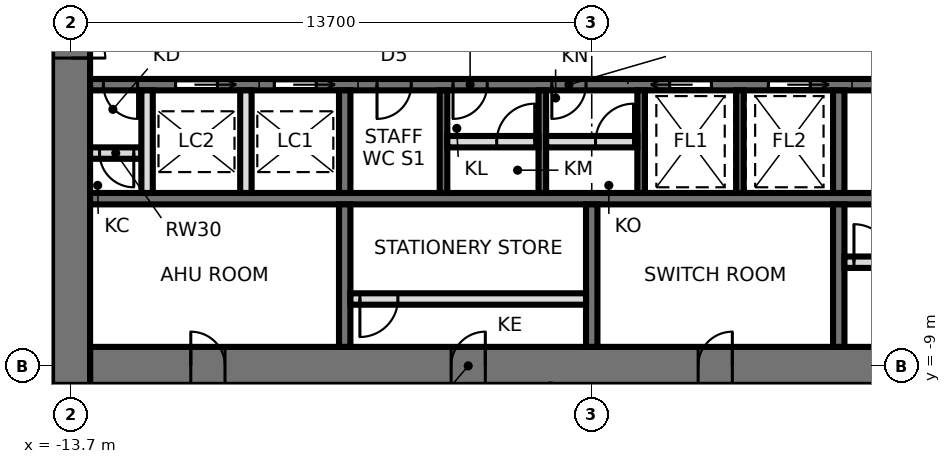
"""IFC4 building model, lengths in metres.
Left out: names, types, materials, properties, quantities, classifications, styles, units other than length and angle.
Written with IfcOpenShell. Run it as: python <this file> out.ifc"""

import sys

from ifc_helpers import new_model, si_unit, direction, frame, frame_2d, origin, place, context, subcontext, project, spatial, rectangle, extrude, element, fill, save


model = new_model("IFC4")
c1 = context("Model", 3, precision=1e-05, world=origin(), true_north=direction((0.0, 1.0)))
c2 = subcontext(c1, "Body", "Model", "MODEL_VIEW")
j1 = project(units=[si_unit("LENGTHUNIT", "METRE"), si_unit("PLANEANGLEUNIT", "RADIAN")], contexts=[c1])
p1 = place(None, origin())
s1 = spatial("IfcSite", under=j1, at=p1, CompositionType="ELEMENT")
p2 = place(p1, origin())
s2 = spatial("IfcBuilding", under=s1, at=p2, CompositionType="ELEMENT")
p3 = place(p2, frame((0.0, 0.0, 187.7)))
s3 = spatial("IfcBuildingStorey", under=s2, at=p3, CompositionType="ELEMENT", Elevation=187.7)
p4 = place(p3, frame((-13.2, -9.0, 0.0), z_axis=(0.0, 0.0, 1.0), x_axis=(1.0, 0.0, 0.0)))
e1 = element("IfcWall", 1, at=p4, inside=s3, PredefinedType="SHEAR", context=c2, shape_type="SweptSolid", body=[
    extrude(rectangle(XDim=26.4, YDim=1.0, at=frame_2d((13.2, 0.0))), origin(), (0.0, 0.0, 1.0), 3.9),
])
p5 = place(p4, frame((2.65, 0.0, 0.0)))
e2 = element("IfcOpeningElement", 2, at=p5, cuts=e1, PredefinedType="OPENING", context=c2, shape_type="SweptSolid", body=[
    extrude(rectangle(XDim=0.9, YDim=2.1, at=frame_2d((0.45, 1.05))), frame((0.0, 0.51, 0.0), z_axis=(0.0, -1.0, 0.0), x_axis=(1.0, 0.0, 0.0)), (0.0, 0.0, 1.0), 1.02),
])
p6 = place(p4, frame((9.5, 0.0, 0.0)))
e3 = element("IfcOpeningElement", 3, at=p6, cuts=e1, PredefinedType="OPENING", context=c2, shape_type="SweptSolid", body=[
    extrude(rectangle(XDim=0.9, YDim=2.1, at=frame_2d((0.45, 1.05))), frame((0.0, 0.51, 0.0), z_axis=(0.0, -1.0, 0.0), x_axis=(1.0, 0.0, 0.0)), (0.0, 0.0, 1.0), 1.02),
])
p7 = place(p4, frame((16.0, 0.0, 0.0)))
e4 = element("IfcOpeningElement", 4, at=p7, cuts=e1, PredefinedType="OPENING", context=c2, shape_type="SweptSolid", body=[
    extrude(rectangle(XDim=0.9, YDim=2.1, at=frame_2d((0.45, 1.05))), frame((0.0, 0.51, 0.0), z_axis=(0.0, -1.0, 0.0), x_axis=(1.0, 0.0, 0.0)), (0.0, 0.0, 1.0), 1.02),
])
p8 = place(p4, frame((22.85, 0.0, 0.0)))
e5 = element("IfcOpeningElement", 5, at=p8, cuts=e1, PredefinedType="OPENING", context=c2, shape_type="SweptSolid", body=[
    extrude(rectangle(XDim=0.9, YDim=2.1, at=frame_2d((0.45, 1.05))), frame((0.0, 0.51, 0.0), z_axis=(0.0, -1.0, 0.0), x_axis=(1.0, 0.0, 0.0)), (0.0, 0.0, 1.0), 1.02),
])
p9 = place(p3, frame((-13.7, 9.5, 0.0), z_axis=(0.0, 0.0, 1.0), x_axis=(0.0, -1.0, 0.0)))
e6 = element("IfcWall", 6, at=p9, inside=s3, PredefinedType="SHEAR", context=c2, shape_type="SweptSolid", body=[
    extrude(rectangle(XDim=19.0, YDim=1.0, at=frame_2d((9.5, 0.0))), origin(), (0.0, 0.0, 1.0), 3.9),
])
p10 = place(p9, frame((8.6, 0.0, 0.0)))
e7 = element("IfcOpeningElement", 7, at=p10, cuts=e6, PredefinedType="OPENING", context=c2, shape_type="SweptSolid", body=[
    extrude(rectangle(XDim=1.8, YDim=2.4, at=frame_2d((0.9, 1.2))), frame((0.0, 0.51, 0.0), z_axis=(0.0, -1.0, 0.0), x_axis=(1.0, 0.0, 0.0)), (0.0, 0.0, 1.0), 1.02),
])
p11 = place(p3, frame((-13.2, -1.6, 0.0), z_axis=(0.0, 0.0, 1.0), x_axis=(1.0, 0.0, 0.0)))
e8 = element("IfcWall", 8, at=p11, inside=s3, PredefinedType="SHEAR", context=c2, shape_type="SweptSolid", body=[
    extrude(rectangle(XDim=26.4, YDim=0.3, at=frame_2d((13.2, 0.0))), origin(), (0.0, 0.0, 1.0), 3.9),
])
p12 = place(p11, frame((25.15, 0.0, 0.0)))
e9 = element("IfcOpeningElement", 9, at=p12, cuts=e8, PredefinedType="OPENING", context=c2, shape_type="SweptSolid", body=[
    extrude(rectangle(XDim=1.0, YDim=2.1, at=frame_2d((0.5, 1.05))), frame((0.0, 0.16, 0.0), z_axis=(0.0, -1.0, 0.0), x_axis=(1.0, 0.0, 0.0)), (0.0, 0.0, 1.0), 0.32),
])
p13 = place(p11, frame((7.55, 0.0, 0.0)))
e10 = element("IfcOpeningElement", 10, at=p13, cuts=e8, PredefinedType="OPENING", context=c2, shape_type="SweptSolid", body=[
    extrude(rectangle(XDim=0.9, YDim=2.1, at=frame_2d((0.45, 1.05))), frame((0.0, 0.16, 0.0), z_axis=(0.0, -1.0, 0.0), x_axis=(1.0, 0.0, 0.0)), (0.0, 0.0, 1.0), 0.32),
])
p14 = place(p11, frame((9.55, 0.0, 0.0)))
e11 = element("IfcOpeningElement", 11, at=p14, cuts=e8, PredefinedType="OPENING", context=c2, shape_type="SweptSolid", body=[
    extrude(rectangle(XDim=0.9, YDim=2.1, at=frame_2d((0.45, 1.05))), frame((0.0, 0.16, 0.0), z_axis=(0.0, -1.0, 0.0), x_axis=(1.0, 0.0, 0.0)), (0.0, 0.0, 1.0), 0.32),
])
p15 = place(p11, frame((12.15, 0.0, 0.0)))
e12 = element("IfcOpeningElement", 12, at=p15, cuts=e8, PredefinedType="OPENING", context=c2, shape_type="SweptSolid", body=[
    extrude(rectangle(XDim=0.9, YDim=2.1, at=frame_2d((0.45, 1.05))), frame((0.0, 0.16, 0.0), z_axis=(0.0, -1.0, 0.0), x_axis=(1.0, 0.0, 0.0)), (0.0, 0.0, 1.0), 0.32),
])
p16 = place(p11, frame((15.25, 0.0, 0.0)))
e13 = element("IfcOpeningElement", 13, at=p16, cuts=e8, PredefinedType="OPENING", context=c2, shape_type="SweptSolid", body=[
    extrude(rectangle(XDim=1.1, YDim=2.3, at=frame_2d((0.55, 1.15))), frame((0.0, 0.16, 0.0), z_axis=(0.0, -1.0, 0.0), x_axis=(1.0, 0.0, 0.0)), (0.0, 0.0, 1.0), 0.32),
])
p17 = place(p11, frame((17.85, 0.0, 0.0)))
e14 = element("IfcOpeningElement", 14, at=p17, cuts=e8, PredefinedType="OPENING", context=c2, shape_type="SweptSolid", body=[
    extrude(rectangle(XDim=1.1, YDim=2.3, at=frame_2d((0.55, 1.15))), frame((0.0, 0.16, 0.0), z_axis=(0.0, -1.0, 0.0), x_axis=(1.0, 0.0, 0.0)), (0.0, 0.0, 1.0), 0.32),
])
p18 = place(p11, frame((4.85, 0.0, 0.0)))
e15 = element("IfcOpeningElement", 15, at=p18, cuts=e8, PredefinedType="OPENING", context=c2, shape_type="SweptSolid", body=[
    extrude(rectangle(XDim=1.1, YDim=2.3, at=frame_2d((0.55, 1.15))), frame((0.0, 0.16, 0.0), z_axis=(0.0, -1.0, 0.0), x_axis=(1.0, 0.0, 0.0)), (0.0, 0.0, 1.0), 0.32),
])
p19 = place(p11, frame((2.25, 0.0, 0.0)))
e16 = element("IfcOpeningElement", 16, at=p19, cuts=e8, PredefinedType="OPENING", context=c2, shape_type="SweptSolid", body=[
    extrude(rectangle(XDim=1.1, YDim=2.3, at=frame_2d((0.55, 1.15))), frame((0.0, 0.16, 0.0), z_axis=(0.0, -1.0, 0.0), x_axis=(1.0, 0.0, 0.0)), (0.0, 0.0, 1.0), 0.32),
])
p20 = place(p11, frame((0.35, 0.0, 0.0)))
e17 = element("IfcOpeningElement", 17, at=p20, cuts=e8, PredefinedType="OPENING", context=c2, shape_type="SweptSolid", body=[
    extrude(rectangle(XDim=0.9, YDim=2.1, at=frame_2d((0.45, 1.05))), frame((0.0, 0.16, 0.0), z_axis=(0.0, -1.0, 0.0), x_axis=(1.0, 0.0, 0.0)), (0.0, 0.0, 1.0), 0.32),
])
p21 = place(p3, frame((-13.2, -4.6, 0.0), z_axis=(0.0, 0.0, 1.0), x_axis=(1.0, 0.0, 0.0)))
e18 = element("IfcWall", 18, at=p21, inside=s3, PredefinedType="SHEAR", context=c2, shape_type="SweptSolid", body=[
    extrude(rectangle(XDim=26.4, YDim=0.3, at=frame_2d((13.2, 0.0))), origin(), (0.0, 0.0, 1.0), 3.9),
])
p22 = place(p3, frame((-6.5, -1.75, 0.0), z_axis=(0.0, 0.0, 1.0), x_axis=(0.0, -1.0, 0.0)))
e19 = element("IfcWall", 19, at=p22, inside=s3, PredefinedType="SHEAR", context=c2, shape_type="SweptSolid", body=[
    extrude(rectangle(XDim=2.7, YDim=0.3, at=frame_2d((1.35, 0.0))), origin(), (0.0, 0.0, 1.0), 3.9),
])
p23 = place(p3, frame((-6.5, -4.75, 0.0), z_axis=(0.0, 0.0, 1.0), x_axis=(0.0, -1.0, 0.0)))
e20 = element("IfcWall", 20, at=p23, inside=s3, PredefinedType="SHEAR", context=c2, shape_type="SweptSolid", body=[
    extrude(rectangle(XDim=3.75, YDim=0.3, at=frame_2d((1.875, 0.0))), origin(), (0.0, 0.0, 1.0), 3.9),
])
p24 = place(p3, frame((6.5, -1.75, 0.0), z_axis=(0.0, 0.0, 1.0), x_axis=(0.0, -1.0, 0.0)))
e21 = element("IfcWall", 21, at=p24, inside=s3, PredefinedType="SHEAR", context=c2, shape_type="SweptSolid", body=[
    extrude(rectangle(XDim=2.7, YDim=0.3, at=frame_2d((1.35, 0.0))), origin(), (0.0, 0.0, 1.0), 3.9),
])
p25 = place(p3, frame((6.5, -4.75, 0.0), z_axis=(0.0, 0.0, 1.0), x_axis=(0.0, -1.0, 0.0)))
e22 = element("IfcWall", 22, at=p25, inside=s3, PredefinedType="SHEAR", context=c2, shape_type="SweptSolid", body=[
    extrude(rectangle(XDim=3.75, YDim=0.3, at=frame_2d((1.875, 0.0))), origin(), (0.0, 0.0, 1.0), 3.9),
])
for number, where, z_axis, x_axis in (
    (23, (-3.9, -1.75, 0.0), (0.0, 0.0, 1.0), (0.0, -1.0, 0.0)),
    (24, (-1.3, -1.75, 0.0), (0.0, 0.0, 1.0), (0.0, -1.0, 0.0)),
    (25, (1.3, -1.75, 0.0), (0.0, 0.0, 1.0), (0.0, -1.0, 0.0)),
    (26, (3.9, -1.75, 0.0), (0.0, 0.0, 1.0), (0.0, -1.0, 0.0)),
):
    element("IfcWall", number, at=place(p3, frame(where, z_axis=z_axis, x_axis=x_axis)), inside=s3, PredefinedType="SHEAR", context=c2, shape_type="SweptSolid", body=[
        extrude(rectangle(XDim=2.7, YDim=0.2, at=frame_2d((1.35, 0.0))), origin(), (0.0, 0.0, 1.0), 3.9),
    ])
p26 = place(p3, frame((0.0, -4.75, 0.0), z_axis=(0.0, 0.0, 1.0), x_axis=(0.0, -1.0, 0.0)))
e27 = element("IfcWall", 27, at=p26, inside=s3, PredefinedType="SHEAR", context=c2, shape_type="SweptSolid", body=[
    extrude(rectangle(XDim=3.75, YDim=0.3, at=frame_2d((1.875, 0.0))), origin(), (0.0, 0.0, 1.0), 3.9),
])
p27 = place(p3, frame((-3.8, -3.1, 0.0), z_axis=(0.0, 0.0, 1.0), x_axis=(1.0, 0.0, 0.0)))
e28 = element("IfcWall", 28, at=p27, inside=s3, PredefinedType="PARTITIONING", context=c2, shape_type="SweptSolid", body=[
    extrude(rectangle(XDim=2.4, YDim=0.3, at=frame_2d((1.2, 0.0))), origin(), (0.0, 0.0, 1.0), 3.74),
])
p28 = place(p27, frame((1.3, 0.0, 0.0)))
e29 = element("IfcOpeningElement", 29, at=p28, cuts=e28, PredefinedType="OPENING", context=c2, shape_type="SweptSolid", body=[
    extrude(rectangle(XDim=1.0, YDim=2.4, at=frame_2d((0.5, 1.2))), frame((0.0, 0.16, 0.0), z_axis=(0.0, -1.0, 0.0), x_axis=(1.0, 0.0, 0.0)), (0.0, 0.0, 1.0), 0.32),
])
p29 = place(p3, frame((-1.2, -3.1, 0.0), z_axis=(0.0, 0.0, 1.0), x_axis=(1.0, 0.0, 0.0)))
e30 = element("IfcWall", 30, at=p29, inside=s3, PredefinedType="PARTITIONING", context=c2, shape_type="SweptSolid", body=[
    extrude(rectangle(XDim=2.4, YDim=0.3, at=frame_2d((1.2, 0.0))), origin(), (0.0, 0.0, 1.0), 3.74),
])
p30 = place(p29, frame((1.3, 0.0, 0.0)))
e31 = element("IfcOpeningElement", 31, at=p30, cuts=e30, PredefinedType="OPENING", context=c2, shape_type="SweptSolid", body=[
    extrude(rectangle(XDim=1.0, YDim=2.4, at=frame_2d((0.5, 1.2))), frame((0.0, 0.16, 0.0), z_axis=(0.0, -1.0, 0.0), x_axis=(1.0, 0.0, 0.0)), (0.0, 0.0, 1.0), 0.32),
])
p31 = place(p3, frame((-6.35, -7.24, 0.0), z_axis=(0.0, 0.0, 1.0), x_axis=(1.0, 0.0, 0.0)))
e32 = element("IfcWall", 32, at=p31, inside=s3, PredefinedType="PARTITIONING", context=c2, shape_type="SweptSolid", body=[
    extrude(rectangle(XDim=6.2, YDim=0.3, at=frame_2d((3.1, 0.0))), origin(), (0.0, 0.0, 1.0), 3.74),
])
p32 = place(p31, frame((0.25, 0.0, 0.0)))
e33 = element("IfcOpeningElement", 33, at=p32, cuts=e32, PredefinedType="OPENING", context=c2, shape_type="SweptSolid", body=[
    extrude(rectangle(XDim=1.0, YDim=2.4, at=frame_2d((0.5, 1.2))), frame((0.0, 0.16, 0.0), z_axis=(0.0, -1.0, 0.0), x_axis=(1.0, 0.0, 0.0)), (0.0, 0.0, 1.0), 0.32),
])
p33 = place(p3, frame((6.65, -6.272, 0.0), z_axis=(0.0, 0.0, 1.0), x_axis=(1.0, 0.0, 0.0)))
e34 = element("IfcWall", 34, at=p33, inside=s3, PredefinedType="PARTITIONING", context=c2, shape_type="SweptSolid", body=[
    extrude(rectangle(XDim=6.55, YDim=0.3, at=frame_2d((3.275, 0.0))), origin(), (0.0, 0.0, 1.0), 3.74),
])
p34 = place(p33, frame((0.25, 0.0, 0.0)))
e35 = element("IfcOpeningElement", 35, at=p34, cuts=e34, PredefinedType="OPENING", context=c2, shape_type="SweptSolid", body=[
    extrude(rectangle(XDim=1.0, YDim=2.4, at=frame_2d((0.5, 1.2))), frame((0.0, 0.16, 0.0), z_axis=(0.0, -1.0, 0.0), x_axis=(1.0, 0.0, 0.0)), (0.0, 0.0, 1.0), 0.32),
])
p35 = place(p3, frame((-13.2, -3.4, 0.0), z_axis=(0.0, 0.0, 1.0), x_axis=(1.0, 0.0, 0.0)))
e36 = element("IfcWall", 36, at=p35, inside=s3, PredefinedType="SOLIDWALL", context=c2, shape_type="SweptSolid", body=[
    extrude(rectangle(XDim=1.35, YDim=0.3, at=frame_2d((0.675, 0.0))), origin(), (0.0, 0.0, 1.0), 3.74),
])
p36 = place(p35, frame((0.25, 0.0, 0.0)))
e37 = element("IfcOpeningElement", 37, at=p36, cuts=e36, PredefinedType="OPENING", context=c2, shape_type="SweptSolid", body=[
    extrude(rectangle(XDim=0.9, YDim=2.1, at=frame_2d((0.45, 1.05))), frame((0.0, 0.16, 0.0), z_axis=(0.0, -1.0, 0.0), x_axis=(1.0, 0.0, 0.0)), (0.0, 0.0, 1.0), 0.32),
])
for number, where, z_axis, x_axis in (
    (38, (-9.1, -1.75, 0.0), (0.0, 0.0, 1.0), (0.0, -1.0, 0.0)),
    (39, (-11.7, -1.75, 0.0), (0.0, 0.0, 1.0), (0.0, -1.0, 0.0)),
):
    element("IfcWall", number, at=place(p3, frame(where, z_axis=z_axis, x_axis=x_axis)), inside=s3, PredefinedType="SOLIDWALL", context=c2, shape_type="SweptSolid", body=[
        extrude(rectangle(XDim=2.7, YDim=0.3, at=frame_2d((1.35, 0.0))), origin(), (0.0, 0.0, 1.0), 3.74),
    ])
p37 = place(p3, frame((-2.196, -20.896, 0.0), z_axis=(0.0, 0.0, 1.0), x_axis=(0.104527293836, 0.99452201828, 0.0)))
e40 = element("IfcWall", 40, at=p37, inside=s3, PredefinedType="PARTITIONING", context=c2, shape_type="SweptSolid", body=[
    extrude(rectangle(XDim=11.459, YDim=0.12, at=frame_2d((5.729, 0.0))), origin(), (0.0, 0.0, 1.0), 3.74),
])
p38 = place(p37, frame((5.254, 0.0, 0.0)))
e41 = element("IfcOpeningElement", 41, at=p38, cuts=e40, PredefinedType="OPENING", context=c2, shape_type="SweptSolid", body=[
    extrude(rectangle(XDim=1.0, YDim=2.4, at=frame_2d((0.5, 1.2))), frame((0.0, 0.07, 0.0), z_axis=(0.0, -1.0, 0.0), x_axis=(1.0, 0.0, 0.0)), (0.0, 0.0, 1.0), 0.14),
])
p39 = place(p10, origin())
e42 = element("IfcDoor", 42, at=p39, inside=s3, OperationType="DOUBLE_DOOR_SINGLE_SWING", PredefinedType="DOOR", context=c2, shape_type="SweptSolid", body=[
    extrude(rectangle(XDim=1.72, YDim=2.36, at=frame_2d((0.9, 1.18))), frame((0.0, 0.025, 0.0), z_axis=(0.0, -1.0, 0.0), x_axis=(1.0, 0.0, 0.0)), (0.0, 0.0, 1.0), 0.05),
    extrude(rectangle(XDim=0.04, YDim=2.4, at=frame_2d((0.02, 1.2))), frame((0.0, 0.25, 0.0), z_axis=(0.0, -1.0, 0.0), x_axis=(1.0, 0.0, 0.0)), (0.0, 0.0, 1.0), 0.5),
    extrude(rectangle(XDim=0.04, YDim=2.4, at=frame_2d((1.78, 1.2))), frame((0.0, 0.25, 0.0), z_axis=(0.0, -1.0, 0.0), x_axis=(1.0, 0.0, 0.0)), (0.0, 0.0, 1.0), 0.5),
    extrude(rectangle(XDim=1.72, YDim=0.04, at=frame_2d((0.9, 2.38))), frame((0.0, 0.25, 0.0), z_axis=(0.0, -1.0, 0.0), x_axis=(1.0, 0.0, 0.0)), (0.0, 0.0, 1.0), 0.5),
])
fill(e7, e42)
p40 = place(p13, frame((0.9, 0.0, 0.0), z_axis=(0.0, 0.0, 1.0), x_axis=(-1.0, 0.0, 0.0)))
e43 = element("IfcDoor", 43, at=p40, inside=s3, OperationType="SINGLE_SWING_RIGHT", PredefinedType="DOOR", context=c2, shape_type="SweptSolid", body=[
    extrude(rectangle(XDim=0.9, YDim=2.1, at=frame_2d((0.45, 1.05))), frame((0.0, 0.025, 0.0), z_axis=(0.0, -1.0, 0.0), x_axis=(1.0, 0.0, 0.0)), (0.0, 0.0, 1.0), 0.05),
])
fill(e10, e43)
p41 = place(p28, origin())
e44 = element("IfcDoor", 44, at=p41, inside=s3, OperationType="SINGLE_SWING_RIGHT", PredefinedType="DOOR", context=c2, shape_type="SweptSolid", body=[
    extrude(rectangle(XDim=1.0, YDim=2.4, at=frame_2d((0.5, 1.2))), frame((0.0, 0.025, 0.0), z_axis=(0.0, -1.0, 0.0), x_axis=(1.0, 0.0, 0.0)), (0.0, 0.0, 1.0), 0.05),
])
fill(e29, e44)
p42 = place(p14, frame((0.9, 0.0, 0.0), z_axis=(0.0, 0.0, 1.0), x_axis=(-1.0, 0.0, 0.0)))
e45 = element("IfcDoor", 45, at=p42, inside=s3, OperationType="SINGLE_SWING_RIGHT", PredefinedType="DOOR", context=c2, shape_type="SweptSolid", body=[
    extrude(rectangle(XDim=0.9, YDim=2.1, at=frame_2d((0.45, 1.05))), frame((0.0, 0.025, 0.0), z_axis=(0.0, -1.0, 0.0), x_axis=(1.0, 0.0, 0.0)), (0.0, 0.0, 1.0), 0.05),
])
fill(e11, e45)
p43 = place(p30, origin())
e46 = element("IfcDoor", 46, at=p43, inside=s3, OperationType="SINGLE_SWING_RIGHT", PredefinedType="DOOR", context=c2, shape_type="SweptSolid", body=[
    extrude(rectangle(XDim=1.0, YDim=2.4, at=frame_2d((0.5, 1.2))), frame((0.0, 0.025, 0.0), z_axis=(0.0, -1.0, 0.0), x_axis=(1.0, 0.0, 0.0)), (0.0, 0.0, 1.0), 0.05),
])
fill(e31, e46)
p44 = place(p15, frame((0.9, 0.0, 0.0), z_axis=(0.0, 0.0, 1.0), x_axis=(-1.0, 0.0, 0.0)))
e47 = element("IfcDoor", 47, at=p44, inside=s3, OperationType="SINGLE_SWING_RIGHT", PredefinedType="DOOR", context=c2, shape_type="SweptSolid", body=[
    extrude(rectangle(XDim=0.9, YDim=2.1, at=frame_2d((0.45, 1.05))), frame((0.0, 0.025, 0.0), z_axis=(0.0, -1.0, 0.0), x_axis=(1.0, 0.0, 0.0)), (0.0, 0.0, 1.0), 0.05),
])
fill(e12, e47)
p45 = place(p16, frame((1.1, 0.0, 0.0), z_axis=(0.0, 0.0, 1.0), x_axis=(-1.0, 0.0, 0.0)))
e48 = element("IfcDoor", 48, at=p45, inside=s3, OperationType="SLIDING_TO_RIGHT", PredefinedType="DOOR", context=c2, shape_type="SweptSolid", body=[
    extrude(rectangle(XDim=1.1, YDim=2.3, at=frame_2d((0.55, 1.15))), frame((0.0, 0.025, 0.0), z_axis=(0.0, -1.0, 0.0), x_axis=(1.0, 0.0, 0.0)), (0.0, 0.0, 1.0), 0.05),
])
fill(e13, e48)
p46 = place(p17, frame((1.1, 0.0, 0.0), z_axis=(0.0, 0.0, 1.0), x_axis=(-1.0, 0.0, 0.0)))
e49 = element("IfcDoor", 49, at=p46, inside=s3, OperationType="SLIDING_TO_LEFT", PredefinedType="DOOR", context=c2, shape_type="SweptSolid", body=[
    extrude(rectangle(XDim=1.1, YDim=2.3, at=frame_2d((0.55, 1.15))), frame((0.0, 0.025, 0.0), z_axis=(0.0, -1.0, 0.0), x_axis=(1.0, 0.0, 0.0)), (0.0, 0.0, 1.0), 0.05),
])
fill(e14, e49)
p47 = place(p18, frame((1.1, 0.0, 0.0), z_axis=(0.0, 0.0, 1.0), x_axis=(-1.0, 0.0, 0.0)))
e50 = element("IfcDoor", 50, at=p47, inside=s3, OperationType="SLIDING_TO_LEFT", PredefinedType="DOOR", context=c2, shape_type="SweptSolid", body=[
    extrude(rectangle(XDim=1.1, YDim=2.3, at=frame_2d((0.55, 1.15))), frame((0.0, 0.025, 0.0), z_axis=(0.0, -1.0, 0.0), x_axis=(1.0, 0.0, 0.0)), (0.0, 0.0, 1.0), 0.05),
])
fill(e15, e50)
p48 = place(p19, frame((1.1, 0.0, 0.0), z_axis=(0.0, 0.0, 1.0), x_axis=(-1.0, 0.0, 0.0)))
e51 = element("IfcDoor", 51, at=p48, inside=s3, OperationType="SLIDING_TO_LEFT", PredefinedType="DOOR", context=c2, shape_type="SweptSolid", body=[
    extrude(rectangle(XDim=1.1, YDim=2.3, at=frame_2d((0.55, 1.15))), frame((0.0, 0.025, 0.0), z_axis=(0.0, -1.0, 0.0), x_axis=(1.0, 0.0, 0.0)), (0.0, 0.0, 1.0), 0.05),
])
fill(e16, e51)
p49 = place(p20, frame((0.9, 0.0, 0.0), z_axis=(0.0, 0.0, 1.0), x_axis=(-1.0, 0.0, 0.0)))
e52 = element("IfcDoor", 52, at=p49, inside=s3, OperationType="SINGLE_SWING_LEFT", PredefinedType="DOOR", context=c2, shape_type="SweptSolid", body=[
    extrude(rectangle(XDim=0.9, YDim=2.1, at=frame_2d((0.45, 1.05))), frame((0.0, 0.025, 0.0), z_axis=(0.0, -1.0, 0.0), x_axis=(1.0, 0.0, 0.0)), (0.0, 0.0, 1.0), 0.05),
])
fill(e17, e52)
p50 = place(p5, origin())
e53 = element("IfcDoor", 53, at=p50, inside=s3, OperationType="SINGLE_SWING_LEFT", PredefinedType="DOOR", context=c2, shape_type="SweptSolid", body=[
    extrude(rectangle(XDim=0.82, YDim=2.06, at=frame_2d((0.45, 1.03))), frame((0.0, 0.025, 0.0), z_axis=(0.0, -1.0, 0.0), x_axis=(1.0, 0.0, 0.0)), (0.0, 0.0, 1.0), 0.05),
    extrude(rectangle(XDim=0.04, YDim=2.1, at=frame_2d((0.02, 1.05))), frame((0.0, 0.25, 0.0), z_axis=(0.0, -1.0, 0.0), x_axis=(1.0, 0.0, 0.0)), (0.0, 0.0, 1.0), 0.5),
    extrude(rectangle(XDim=0.04, YDim=2.1, at=frame_2d((0.88, 1.05))), frame((0.0, 0.25, 0.0), z_axis=(0.0, -1.0, 0.0), x_axis=(1.0, 0.0, 0.0)), (0.0, 0.0, 1.0), 0.5),
    extrude(rectangle(XDim=0.82, YDim=0.04, at=frame_2d((0.45, 2.08))), frame((0.0, 0.25, 0.0), z_axis=(0.0, -1.0, 0.0), x_axis=(1.0, 0.0, 0.0)), (0.0, 0.0, 1.0), 0.5),
])
fill(e2, e53)
p51 = place(p6, origin())
e54 = element("IfcDoor", 54, at=p51, inside=s3, OperationType="SINGLE_SWING_RIGHT", PredefinedType="DOOR", context=c2, shape_type="SweptSolid", body=[
    extrude(rectangle(XDim=0.82, YDim=2.06, at=frame_2d((0.45, 1.03))), frame((0.0, 0.025, 0.0), z_axis=(0.0, -1.0, 0.0), x_axis=(1.0, 0.0, 0.0)), (0.0, 0.0, 1.0), 0.05),
    extrude(rectangle(XDim=0.04, YDim=2.1, at=frame_2d((0.02, 1.05))), frame((0.0, 0.25, 0.0), z_axis=(0.0, -1.0, 0.0), x_axis=(1.0, 0.0, 0.0)), (0.0, 0.0, 1.0), 0.5),
    extrude(rectangle(XDim=0.04, YDim=2.1, at=frame_2d((0.88, 1.05))), frame((0.0, 0.25, 0.0), z_axis=(0.0, -1.0, 0.0), x_axis=(1.0, 0.0, 0.0)), (0.0, 0.0, 1.0), 0.5),
    extrude(rectangle(XDim=0.82, YDim=0.04, at=frame_2d((0.45, 2.08))), frame((0.0, 0.25, 0.0), z_axis=(0.0, -1.0, 0.0), x_axis=(1.0, 0.0, 0.0)), (0.0, 0.0, 1.0), 0.5),
])
fill(e3, e54)
p52 = place(p7, origin())
e55 = element("IfcDoor", 55, at=p52, inside=s3, OperationType="SINGLE_SWING_RIGHT", PredefinedType="DOOR", context=c2, shape_type="SweptSolid", body=[
    extrude(rectangle(XDim=0.82, YDim=2.06, at=frame_2d((0.45, 1.03))), frame((0.0, 0.025, 0.0), z_axis=(0.0, -1.0, 0.0), x_axis=(1.0, 0.0, 0.0)), (0.0, 0.0, 1.0), 0.05),
    extrude(rectangle(XDim=0.04, YDim=2.1, at=frame_2d((0.02, 1.05))), frame((0.0, 0.25, 0.0), z_axis=(0.0, -1.0, 0.0), x_axis=(1.0, 0.0, 0.0)), (0.0, 0.0, 1.0), 0.5),
    extrude(rectangle(XDim=0.04, YDim=2.1, at=frame_2d((0.88, 1.05))), frame((0.0, 0.25, 0.0), z_axis=(0.0, -1.0, 0.0), x_axis=(1.0, 0.0, 0.0)), (0.0, 0.0, 1.0), 0.5),
    extrude(rectangle(XDim=0.82, YDim=0.04, at=frame_2d((0.45, 2.08))), frame((0.0, 0.25, 0.0), z_axis=(0.0, -1.0, 0.0), x_axis=(1.0, 0.0, 0.0)), (0.0, 0.0, 1.0), 0.5),
])
fill(e4, e55)
p53 = place(p32, frame((1.0, 0.0, 0.0), z_axis=(0.0, 0.0, 1.0), x_axis=(-1.0, 0.0, 0.0)))
e56 = element("IfcDoor", 56, at=p53, inside=s3, OperationType="SINGLE_SWING_RIGHT", PredefinedType="DOOR", context=c2, shape_type="SweptSolid", body=[
    extrude(rectangle(XDim=1.0, YDim=2.4, at=frame_2d((0.5, 1.2))), frame((0.0, 0.025, 0.0), z_axis=(0.0, -1.0, 0.0), x_axis=(1.0, 0.0, 0.0)), (0.0, 0.0, 1.0), 0.05),
])
fill(e33, e56)
p54 = place(p34, origin())
e57 = element("IfcDoor", 57, at=p54, inside=s3, OperationType="SINGLE_SWING_LEFT", PredefinedType="DOOR", context=c2, shape_type="SweptSolid", body=[
    extrude(rectangle(XDim=1.0, YDim=2.4, at=frame_2d((0.5, 1.2))), frame((0.0, 0.025, 0.0), z_axis=(0.0, -1.0, 0.0), x_axis=(1.0, 0.0, 0.0)), (0.0, 0.0, 1.0), 0.05),
])
fill(e35, e57)
p55 = place(p36, frame((0.9, 0.0, 0.0), z_axis=(0.0, 0.0, 1.0), x_axis=(-1.0, 0.0, 0.0)))
e58 = element("IfcDoor", 58, at=p55, inside=s3, OperationType="SINGLE_SWING_LEFT", PredefinedType="DOOR", context=c2, shape_type="SweptSolid", body=[
    extrude(rectangle(XDim=0.9, YDim=2.1, at=frame_2d((0.45, 1.05))), frame((0.0, 0.025, 0.0), z_axis=(0.0, -1.0, 0.0), x_axis=(1.0, 0.0, 0.0)), (0.0, 0.0, 1.0), 0.05),
])
fill(e37, e58)
save(model, sys.argv[1])
